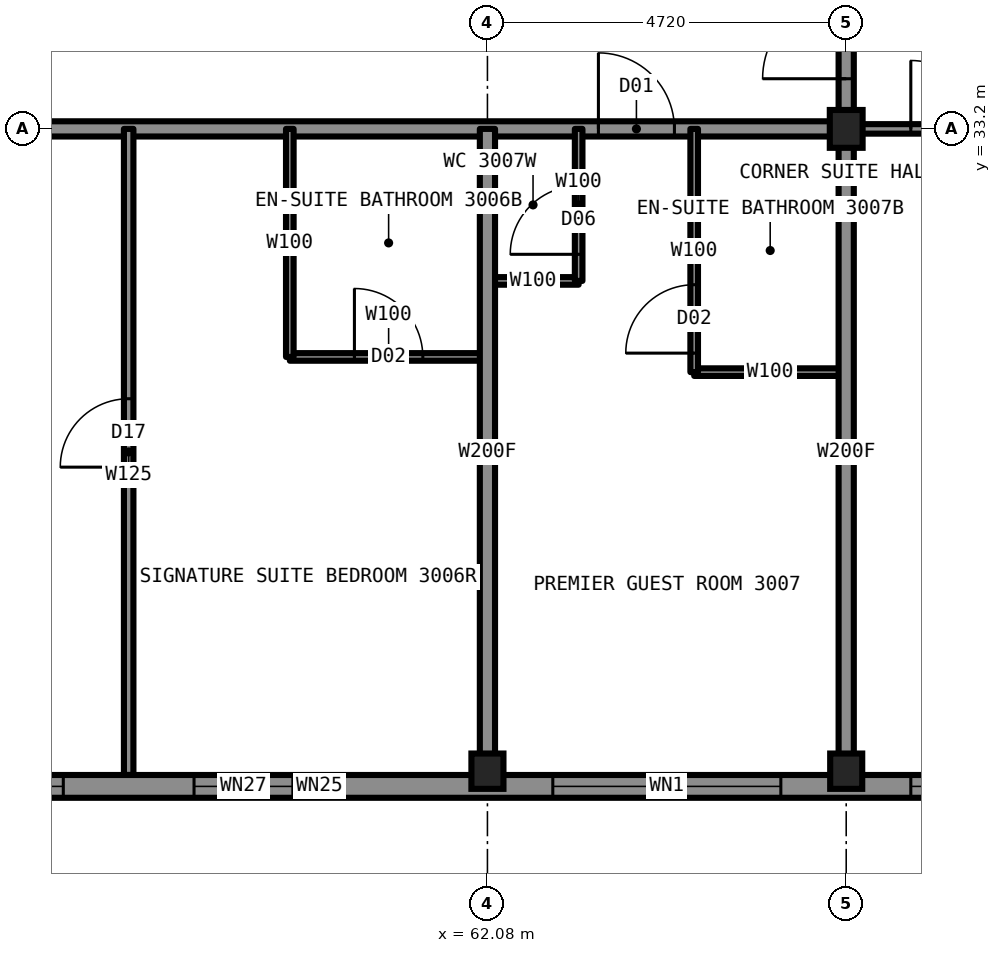
"""IFC4 building model, lengths in metres.
Left out: names, types, materials, properties, quantities, classifications, styles, units other than length and angle.
Written with IfcOpenShell. Run it as: python <this file> out.ifc"""

import sys

from ifc_helpers import new_model, si_unit, direction, frame, frame_2d, origin, origin_2d, place, context, subcontext, project, spatial, rectangle, i_section, extrude, element, fill, save


model = new_model("IFC4")
c1 = context("Model", 3, precision=1e-05, world=origin(), true_north=direction((0.0, 1.0)))
c2 = subcontext(c1, "Body", "Model", "MODEL_VIEW")
j1 = project(units=[si_unit("LENGTHUNIT", "METRE"), si_unit("PLANEANGLEUNIT", "RADIAN")], contexts=[c1])
p1 = place(None, origin())
s1 = spatial("IfcSite", under=j1, at=p1, CompositionType="ELEMENT")
p2 = place(p1, origin())
s2 = spatial("IfcBuilding", under=s1, at=p2, CompositionType="ELEMENT")
p3 = place(p2, frame((0.0, 0.0, 114.4)))
s3 = spatial("IfcBuildingStorey", under=s2, at=p3, CompositionType="ELEMENT", Elevation=114.4)
for number, where, z_axis, x_axis in (
    (1, (62.08, 24.75, 0.0), (0.0, 0.0, 1.0), (1.0, 0.0, 0.0)),
    (2, (66.8, 24.75, 0.0), (0.0, 0.0, 1.0), (1.0, 0.0, 0.0)),
):
    element("IfcColumn", number, at=place(p3, frame(where, z_axis=z_axis, x_axis=x_axis)), inside=s3, PredefinedType="COLUMN", context=c2, shape_type="SweptSolid", body=[
        extrude(i_section(OverallWidth=0.422, OverallDepth=0.465, WebThickness=0.045, FlangeThickness=0.073, at=origin_2d()), origin(), (0.0, 0.0, 1.0), 3.5),
    ])
p4 = place(p3, frame((66.8, 33.2, 0.0), z_axis=(0.0, 0.0, 1.0), x_axis=(1.0, 0.0, 0.0)))
e3 = element("IfcColumn", 3, at=p4, inside=s3, PredefinedType="COLUMN", context=c2, shape_type="SweptSolid", body=[
    extrude(i_section(OverallWidth=0.432, OverallDepth=0.498, WebThickness=0.056, FlangeThickness=0.089, at=origin_2d()), origin(), (0.0, 0.0, 1.0), 3.5),
])
p5 = place(p3, frame((43.2, 33.2, 0.0), z_axis=(0.0, 0.0, 1.0), x_axis=(1.0, 0.0, 0.0)))
e4 = element("IfcWall", 4, at=p5, inside=s3, PredefinedType="PARTITIONING", context=c2, shape_type="SweptSolid", body=[
    extrude(rectangle(XDim=23.6, YDim=0.2, at=frame_2d((11.8, 0.0))), origin(), (0.0, 0.0, 1.0), 3.33),
])
p6 = place(p5, frame((0.7, 0.0, 0.0)))
e5 = element("IfcOpeningElement", 5, at=p6, cuts=e4, PredefinedType="OPENING", context=c2, shape_type="SweptSolid", body=[
    extrude(rectangle(XDim=1.0, YDim=2.2, at=frame_2d((0.5, 1.1))), frame((0.0, 0.11, 0.0), z_axis=(0.0, -1.0, 0.0), x_axis=(1.0, 0.0, 0.0)), (0.0, 0.0, 1.0), 0.22),
])
p7 = place(p5, frame((6.57, 0.0, 0.0)))
e6 = element("IfcOpeningElement", 6, at=p7, cuts=e4, PredefinedType="OPENING", context=c2, shape_type="SweptSolid", body=[
    extrude(rectangle(XDim=1.1, YDim=2.2, at=frame_2d((0.55, 1.1))), frame((0.0, 0.11, 0.0), z_axis=(0.0, -1.0, 0.0), x_axis=(1.0, 0.0, 0.0)), (0.0, 0.0, 1.0), 0.22),
])
p8 = place(p5, frame((20.34, 0.0, 0.0)))
e7 = element("IfcOpeningElement", 7, at=p8, cuts=e4, PredefinedType="OPENING", context=c2, shape_type="SweptSolid", body=[
    extrude(rectangle(XDim=1.0, YDim=2.2, at=frame_2d((0.5, 1.1))), frame((0.0, 0.11, 0.0), z_axis=(0.0, -1.0, 0.0), x_axis=(1.0, 0.0, 0.0)), (0.0, 0.0, 1.0), 0.22),
])
p9 = place(p3, frame((66.8, 33.2, 0.0), z_axis=(0.0, 0.0, 1.0), x_axis=(1.0, 0.0, 0.0)))
e8 = element("IfcWall", 8, at=p9, inside=s3, PredefinedType="PARTITIONING", context=c2, shape_type="SweptSolid", body=[
    extrude(rectangle(XDim=8.5, YDim=0.125, at=frame_2d((4.25, 0.0))), origin(), (0.0, 0.0, 1.0), 2.573),
])
p10 = place(p9, frame((0.85, 0.0, 0.0)))
e9 = element("IfcOpeningElement", 9, at=p10, cuts=e8, PredefinedType="OPENING", context=c2, shape_type="SweptSolid", body=[
    extrude(rectangle(XDim=0.9, YDim=2.2, at=frame_2d((0.45, 1.1))), frame((0.0, 0.073, 0.0), z_axis=(0.0, -1.0, 0.0), x_axis=(1.0, 0.0, 0.0)), (0.0, 0.0, 1.0), 0.145),
])
p11 = place(p3, frame((62.08, 31.2, 0.0), z_axis=(0.0, 0.0, 1.0), x_axis=(1.0, 0.0, 0.0)))
e10 = element("IfcWall", 10, at=p11, inside=s3, PredefinedType="PARTITIONING", context=c2, shape_type="SweptSolid", body=[
    extrude(rectangle(XDim=1.2, YDim=0.1, at=frame_2d((0.6, 0.0))), origin(), (0.0, 0.0, 1.0), 3.33),
])
p12 = place(p3, frame((59.48, 30.2, 0.0), z_axis=(0.0, 0.0, 1.0), x_axis=(1.0, 0.0, 0.0)))
e11 = element("IfcWall", 11, at=p12, inside=s3, PredefinedType="PARTITIONING", context=c2, shape_type="SweptSolid", body=[
    extrude(rectangle(XDim=2.6, YDim=0.1, at=frame_2d((1.3, 0.0))), origin(), (0.0, 0.0, 1.0), 3.33),
])
p13 = place(p12, frame((0.85, 0.0, 0.0)))
e12 = element("IfcOpeningElement", 12, at=p13, cuts=e11, PredefinedType="OPENING", context=c2, shape_type="SweptSolid", body=[
    extrude(rectangle(XDim=0.9, YDim=2.1, at=frame_2d((0.45, 1.05))), frame((0.0, 0.06, 0.0), z_axis=(0.0, -1.0, 0.0), x_axis=(1.0, 0.0, 0.0)), (0.0, 0.0, 1.0), 0.12),
])
p14 = place(p3, frame((64.8, 30.0, 0.0), z_axis=(0.0, 0.0, 1.0), x_axis=(1.0, 0.0, 0.0)))
e13 = element("IfcWall", 13, at=p14, inside=s3, PredefinedType="PARTITIONING", context=c2, shape_type="SweptSolid", body=[
    extrude(rectangle(XDim=2.0, YDim=0.1, at=frame_2d((1.0, 0.0))), origin(), (0.0, 0.0, 1.0), 2.731),
])
p15 = place(p3, frame((66.8, 33.2, 0.0), z_axis=(0.0, 0.0, 1.0), x_axis=(0.0, 1.0, 0.0)))
e14 = element("IfcWall", 14, at=p15, inside=s3, PredefinedType="PARTITIONING", context=c2, shape_type="SweptSolid", body=[
    extrude(rectangle(XDim=4.72, YDim=0.2, at=frame_2d((2.36, 0.0))), origin(), (0.0, 0.0, 1.0), 3.33),
])
p16 = place(p15, frame((0.66, 0.0, 0.0)))
e15 = element("IfcOpeningElement", 15, at=p16, cuts=e14, PredefinedType="OPENING", context=c2, shape_type="SweptSolid", body=[
    extrude(rectangle(XDim=1.1, YDim=2.2, at=frame_2d((0.55, 1.1))), frame((0.0, 0.11, 0.0), z_axis=(0.0, -1.0, 0.0), x_axis=(1.0, 0.0, 0.0)), (0.0, 0.0, 1.0), 0.22),
])
p17 = place(p3, frame((66.8, 24.7, 0.0), z_axis=(0.0, 0.0, 1.0), x_axis=(0.0, 1.0, 0.0)))
e16 = element("IfcWall", 16, at=p17, inside=s3, PredefinedType="PARTITIONING", context=c2, shape_type="SweptSolid", body=[
    extrude(rectangle(XDim=8.5, YDim=0.2, at=frame_2d((4.25, 0.0))), origin(), (0.0, 0.0, 1.0), 2.573),
])
p18 = place(p3, frame((57.36, 24.7, 0.0), z_axis=(0.0, 0.0, 1.0), x_axis=(0.0, 1.0, 0.0)))
e17 = element("IfcWall", 17, at=p18, inside=s3, PredefinedType="PARTITIONING", context=c2, shape_type="SweptSolid", body=[
    extrude(rectangle(XDim=8.5, YDim=0.125, at=frame_2d((4.25, 0.0))), origin(), (0.0, 0.0, 1.0), 3.33),
])
p19 = place(p18, frame((4.05, 0.0, 0.0)))
e18 = element("IfcOpeningElement", 18, at=p19, cuts=e17, PredefinedType="OPENING", context=c2, shape_type="SweptSolid", body=[
    extrude(rectangle(XDim=0.9, YDim=2.2, at=frame_2d((0.45, 1.1))), frame((0.0, 0.073, 0.0), z_axis=(0.0, -1.0, 0.0), x_axis=(1.0, 0.0, 0.0)), (0.0, 0.0, 1.0), 0.145),
])
p20 = place(p3, frame((59.48, 30.2, 0.0), z_axis=(0.0, 0.0, 1.0), x_axis=(0.0, 1.0, 0.0)))
e19 = element("IfcWall", 19, at=p20, inside=s3, PredefinedType="PARTITIONING", context=c2, shape_type="SweptSolid", body=[
    extrude(rectangle(XDim=3.0, YDim=0.1, at=frame_2d((1.5, 0.0))), origin(), (0.0, 0.0, 1.0), 3.33),
])
p21 = place(p3, frame((62.08, 24.7, 0.0), z_axis=(0.0, 0.0, 1.0), x_axis=(0.0, 1.0, 0.0)))
e20 = element("IfcWall", 20, at=p21, inside=s3, PredefinedType="PARTITIONING", context=c2, shape_type="SweptSolid", body=[
    extrude(rectangle(XDim=8.5, YDim=0.2, at=frame_2d((4.25, 0.0))), origin(), (0.0, 0.0, 1.0), 2.573),
])
p22 = place(p3, frame((63.28, 31.2, 0.0), z_axis=(0.0, 0.0, 1.0), x_axis=(0.0, 1.0, 0.0)))
e21 = element("IfcWall", 21, at=p22, inside=s3, PredefinedType="PARTITIONING", context=c2, shape_type="SweptSolid", body=[
    extrude(rectangle(XDim=2.0, YDim=0.1, at=frame_2d((1.0, 0.0))), origin(), (0.0, 0.0, 1.0), 3.33),
])
p23 = place(p22, frame((0.35, 0.0, 0.0)))
e22 = element("IfcOpeningElement", 22, at=p23, cuts=e21, PredefinedType="OPENING", context=c2, shape_type="SweptSolid", body=[
    extrude(rectangle(XDim=0.9, YDim=2.1, at=frame_2d((0.45, 1.05))), frame((0.0, 0.06, 0.0), z_axis=(0.0, -1.0, 0.0), x_axis=(1.0, 0.0, 0.0)), (0.0, 0.0, 1.0), 0.12),
])
p24 = place(p3, frame((64.8, 30.0, 0.0), z_axis=(0.0, 0.0, 1.0), x_axis=(0.0, 1.0, 0.0)))
e23 = element("IfcWall", 23, at=p24, inside=s3, PredefinedType="PARTITIONING", context=c2, shape_type="SweptSolid", body=[
    extrude(rectangle(XDim=3.2, YDim=0.1, at=frame_2d((1.6, 0.0))), origin(), (0.0, 0.0, 1.0), 3.33),
])
p25 = place(p24, frame((0.25, 0.0, 0.0)))
e24 = element("IfcOpeningElement", 24, at=p25, cuts=e23, PredefinedType="OPENING", context=c2, shape_type="SweptSolid", body=[
    extrude(rectangle(XDim=0.9, YDim=2.1, at=frame_2d((0.45, 1.05))), frame((0.0, 0.06, 0.0), z_axis=(0.0, -1.0, 0.0), x_axis=(1.0, 0.0, 0.0)), (0.0, 0.0, 1.0), 0.12),
])
p26 = place(p3, frame((39.9, 24.55, 0.0), z_axis=(0.0, 0.0, 1.0), x_axis=(1.0, 0.0, 0.0)))
e25 = element("IfcWall", 25, at=p26, inside=s3, PredefinedType="SOLIDWALL", context=c2, shape_type="SweptSolid", body=[
    extrude(rectangle(XDim=30.2, YDim=0.3, at=frame_2d((15.1, 0.0))), origin(), (0.0, 0.0, 1.0), 2.83),
])
p27 = place(p26, frame((0.85, 0.0, 0.5)))
e26 = element("IfcOpeningElement", 26, at=p27, cuts=e25, PredefinedType="OPENING", context=c2, shape_type="SweptSolid", body=[
    extrude(rectangle(XDim=1.6, YDim=2.0, at=frame_2d((0.8, 1.0))), frame((0.0, 0.16, 0.0), z_axis=(0.0, -1.0, 0.0), x_axis=(1.0, 0.0, 0.0)), (0.0, 0.0, 1.0), 0.32),
])
p28 = place(p26, frame((4.16, 0.0, 0.5)))
e27 = element("IfcOpeningElement", 27, at=p28, cuts=e25, PredefinedType="OPENING", context=c2, shape_type="SweptSolid", body=[
    extrude(rectangle(XDim=3.0, YDim=2.0, at=frame_2d((1.5, 1.0))), frame((0.0, 0.16, 0.0), z_axis=(0.0, -1.0, 0.0), x_axis=(1.0, 0.0, 0.0)), (0.0, 0.0, 1.0), 0.32),
])
p29 = place(p26, frame((10.53, 0.0, 0.5)))
e28 = element("IfcOpeningElement", 28, at=p29, cuts=e25, PredefinedType="OPENING", context=c2, shape_type="SweptSolid", body=[
    extrude(rectangle(XDim=1.3, YDim=1.9, at=frame_2d((0.65, 0.95))), frame((0.0, 0.16, 0.0), z_axis=(0.0, -1.0, 0.0), x_axis=(1.0, 0.0, 0.0)), (0.0, 0.0, 1.0), 0.32),
])
p30 = place(p26, frame((13.6, 0.0, 0.5)))
e29 = element("IfcOpeningElement", 29, at=p30, cuts=e25, PredefinedType="OPENING", context=c2, shape_type="SweptSolid", body=[
    extrude(rectangle(XDim=3.0, YDim=2.0, at=frame_2d((1.5, 1.0))), frame((0.0, 0.16, 0.0), z_axis=(0.0, -1.0, 0.0), x_axis=(1.0, 0.0, 0.0)), (0.0, 0.0, 1.0), 0.32),
])
p31 = place(p26, frame((18.32, 0.0, 0.5)))
e30 = element("IfcOpeningElement", 30, at=p31, cuts=e25, PredefinedType="OPENING", context=c2, shape_type="SweptSolid", body=[
    extrude(rectangle(XDim=1.3, YDim=1.9, at=frame_2d((0.65, 0.95))), frame((0.0, 0.16, 0.0), z_axis=(0.0, -1.0, 0.0), x_axis=(1.0, 0.0, 0.0)), (0.0, 0.0, 1.0), 0.32),
])
p32 = place(p26, frame((23.04, 0.0, 0.5)))
e31 = element("IfcOpeningElement", 31, at=p32, cuts=e25, PredefinedType="OPENING", context=c2, shape_type="SweptSolid", body=[
    extrude(rectangle(XDim=3.0, YDim=2.0, at=frame_2d((1.5, 1.0))), frame((0.0, 0.16, 0.0), z_axis=(0.0, -1.0, 0.0), x_axis=(1.0, 0.0, 0.0)), (0.0, 0.0, 1.0), 0.32),
])
p33 = place(p26, frame((27.75, 0.0, 0.5)))
e32 = element("IfcOpeningElement", 32, at=p33, cuts=e25, PredefinedType="OPENING", context=c2, shape_type="SweptSolid", body=[
    extrude(rectangle(XDim=1.6, YDim=2.0, at=frame_2d((0.8, 1.0))), frame((0.0, 0.16, 0.0), z_axis=(0.0, -1.0, 0.0), x_axis=(1.0, 0.0, 0.0)), (0.0, 0.0, 1.0), 0.32),
])
p34 = place(p26, frame((9.88, 0.0, 0.5)))
e33 = element("IfcOpeningElement", 33, at=p34, cuts=e25, PredefinedType="OPENING", context=c2, shape_type="SweptSolid", body=[
    extrude(rectangle(XDim=0.6, YDim=0.9, at=frame_2d((0.3, 0.45))), frame((0.0, 0.16, 0.0), z_axis=(0.0, -1.0, 0.0), x_axis=(1.0, 0.0, 0.0)), (0.0, 0.0, 1.0), 0.32),
])
p35 = place(p26, frame((19.67, 0.0, 0.5)))
e34 = element("IfcOpeningElement", 34, at=p35, cuts=e25, PredefinedType="OPENING", context=c2, shape_type="SweptSolid", body=[
    extrude(rectangle(XDim=0.6, YDim=0.9, at=frame_2d((0.3, 0.45))), frame((0.0, 0.16, 0.0), z_axis=(0.0, -1.0, 0.0), x_axis=(1.0, 0.0, 0.0)), (0.0, 0.0, 1.0), 0.32),
])
p36 = place(p13, origin())
e35 = element("IfcDoor", 35, at=p36, inside=s3, OperationType="SINGLE_SWING_RIGHT", PredefinedType="DOOR", context=c2, shape_type="SweptSolid", body=[
    extrude(rectangle(XDim=0.9, YDim=2.1, at=frame_2d((0.45, 1.05))), frame((0.0, 0.025, 0.0), z_axis=(0.0, -1.0, 0.0), x_axis=(1.0, 0.0, 0.0)), (0.0, 0.0, 1.0), 0.05),
])
fill(e12, e35)
p37 = place(p19, origin())
e36 = element("IfcDoor", 36, at=p37, inside=s3, OperationType="SINGLE_SWING_LEFT", PredefinedType="DOOR", context=c2, shape_type="SweptSolid", body=[
    extrude(rectangle(XDim=0.9, YDim=2.2, at=frame_2d((0.45, 1.1))), frame((0.0, 0.025, 0.0), z_axis=(0.0, -1.0, 0.0), x_axis=(1.0, 0.0, 0.0)), (0.0, 0.0, 1.0), 0.05),
])
fill(e18, e36)
p38 = place(p8, origin())
e37 = element("IfcDoor", 37, at=p38, inside=s3, OperationType="SINGLE_SWING_LEFT", PredefinedType="DOOR", context=c2, shape_type="SweptSolid", body=[
    extrude(rectangle(XDim=1.0, YDim=2.2, at=frame_2d((0.5, 1.1))), frame((0.0, 0.025, 0.0), z_axis=(0.0, -1.0, 0.0), x_axis=(1.0, 0.0, 0.0)), (0.0, 0.0, 1.0), 0.05),
])
fill(e7, e37)
p39 = place(p25, origin())
e38 = element("IfcDoor", 38, at=p39, inside=s3, OperationType="SINGLE_SWING_RIGHT", PredefinedType="DOOR", context=c2, shape_type="SweptSolid", body=[
    extrude(rectangle(XDim=0.9, YDim=2.1, at=frame_2d((0.45, 1.05))), frame((0.0, 0.025, 0.0), z_axis=(0.0, -1.0, 0.0), x_axis=(1.0, 0.0, 0.0)), (0.0, 0.0, 1.0), 0.05),
])
fill(e24, e38)
p40 = place(p23, origin())
e39 = element("IfcDoor", 39, at=p40, inside=s3, OperationType="SINGLE_SWING_LEFT", PredefinedType="DOOR", context=c2, shape_type="SweptSolid", body=[
    extrude(rectangle(XDim=0.9, YDim=2.1, at=frame_2d((0.45, 1.05))), frame((0.0, 0.025, 0.0), z_axis=(0.0, -1.0, 0.0), x_axis=(1.0, 0.0, 0.0)), (0.0, 0.0, 1.0), 0.05),
])
fill(e22, e39)
p41 = place(p10, origin())
e40 = element("IfcDoor", 40, at=p41, inside=s3, OperationType="SINGLE_SWING_LEFT", PredefinedType="DOOR", context=c2, shape_type="SweptSolid", body=[
    extrude(rectangle(XDim=0.9, YDim=2.2, at=frame_2d((0.45, 1.1))), frame((0.0, 0.025, 0.0), z_axis=(0.0, -1.0, 0.0), x_axis=(1.0, 0.0, 0.0)), (0.0, 0.0, 1.0), 0.05),
])
fill(e9, e40)
p42 = place(p16, origin())
e41 = element("IfcDoor", 41, at=p42, inside=s3, OperationType="SINGLE_SWING_LEFT", PredefinedType="DOOR", context=c2, shape_type="SweptSolid", body=[
    extrude(rectangle(XDim=1.1, YDim=2.2, at=frame_2d((0.55, 1.1))), frame((0.0, 0.025, 0.0), z_axis=(0.0, -1.0, 0.0), x_axis=(1.0, 0.0, 0.0)), (0.0, 0.0, 1.0), 0.05),
])
fill(e15, e41)
p43 = place(p30, origin())
e42 = element("IfcWindow", 42, at=p43, inside=s3, PartitioningType="SINGLE_PANEL", PredefinedType="WINDOW", context=c2, shape_type="SweptSolid", body=[
    extrude(rectangle(XDim=3.0, YDim=2.0, at=frame_2d((1.5, 1.0))), frame((0.0, 0.03, 0.0), z_axis=(0.0, -1.0, 0.0), x_axis=(1.0, 0.0, 0.0)), (0.0, 0.0, 1.0), 0.06),
])
fill(e29, e42)
p44 = place(p31, origin())
e43 = element("IfcWindow", 43, at=p44, inside=s3, PartitioningType="SINGLE_PANEL", PredefinedType="WINDOW", context=c2, shape_type="SweptSolid", body=[
    extrude(rectangle(XDim=1.3, YDim=1.9, at=frame_2d((0.65, 0.95))), frame((0.0, 0.03, 0.0), z_axis=(0.0, -1.0, 0.0), x_axis=(1.0, 0.0, 0.0)), (0.0, 0.0, 1.0), 0.06),
])
fill(e30, e43)
p45 = place(p32, origin())
e44 = element("IfcWindow", 44, at=p45, inside=s3, PartitioningType="SINGLE_PANEL", PredefinedType="WINDOW", context=c2, shape_type="SweptSolid", body=[
    extrude(rectangle(XDim=3.0, YDim=2.0, at=frame_2d((1.5, 1.0))), frame((0.0, 0.03, 0.0), z_axis=(0.0, -1.0, 0.0), x_axis=(1.0, 0.0, 0.0)), (0.0, 0.0, 1.0), 0.06),
])
fill(e31, e44)
p46 = place(p33, origin())
e45 = element("IfcWindow", 45, at=p46, inside=s3, PartitioningType="SINGLE_PANEL", PredefinedType="WINDOW", context=c2, shape_type="SweptSolid", body=[
    extrude(rectangle(XDim=1.6, YDim=2.0, at=frame_2d((0.8, 1.0))), frame((0.0, 0.03, 0.0), z_axis=(0.0, -1.0, 0.0), x_axis=(1.0, 0.0, 0.0)), (0.0, 0.0, 1.0), 0.06),
])
fill(e32, e45)
p47 = place(p35, origin())
e46 = element("IfcWindow", 46, at=p47, inside=s3, PartitioningType="SINGLE_PANEL", PredefinedType="WINDOW", context=c2, shape_type="SweptSolid", body=[
    extrude(rectangle(XDim=0.6, YDim=0.9, at=frame_2d((0.3, 0.45))), frame((0.0, 0.03, 0.0), z_axis=(0.0, -1.0, 0.0), x_axis=(1.0, 0.0, 0.0)), (0.0, 0.0, 1.0), 0.06),
])
fill(e34, e46)
save(model, sys.argv[1])
